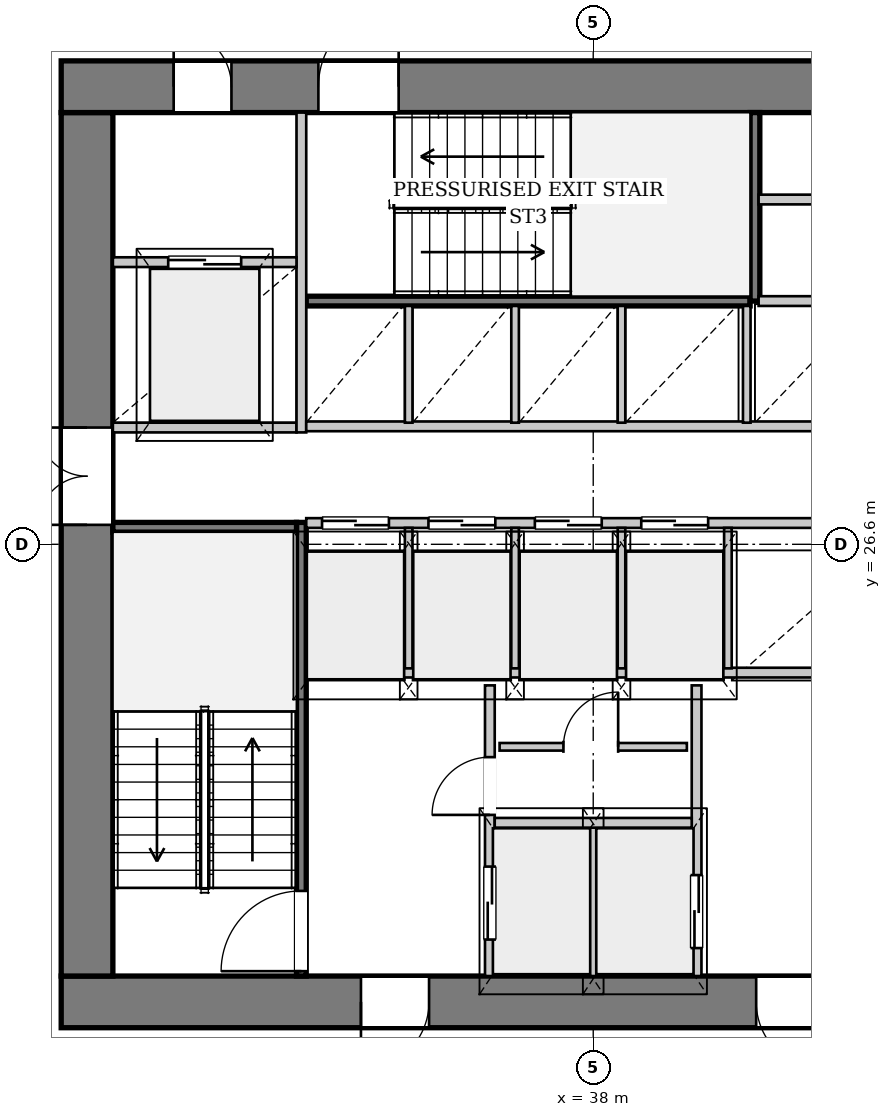
"""IFC4 building model, lengths in metres.
Left out: names, types, materials, properties, quantities, classifications, styles, units other than length and angle.
Written with IfcOpenShell. Run it as: python <this file> out.ifc"""

import sys

from ifc_helpers import new_model, si_unit, direction, frame, frame_2d, origin, place, context, subcontext, project, spatial, rectangle, extrude, source, transform, mapped, element, fill, save


model = new_model("IFC4")
c1 = context("Model", 3, precision=1e-05, world=origin(), true_north=direction((0.0, 1.0)))
c2 = subcontext(c1, "Body", "Model", "MODEL_VIEW")
j1 = project(units=[si_unit("LENGTHUNIT", "METRE"), si_unit("PLANEANGLEUNIT", "RADIAN")], contexts=[c1])
p1 = place(None, origin())
s1 = spatial("IfcSite", under=j1, at=p1, CompositionType="ELEMENT")
p2 = place(p1, origin())
s2 = spatial("IfcBuilding", under=s1, at=p2, CompositionType="ELEMENT")
p3 = place(p2, frame((0.0, 0.0, 43.5)))
s3 = spatial("IfcBuildingStorey", under=s2, at=p3, CompositionType="ELEMENT", Elevation=43.5)
p4 = place(p3, frame((46.75, 19.075, 0.0), z_axis=(0.0, 0.0, 1.0), x_axis=(-1.0, 0.0, 0.0)))
e1 = element("IfcWall", 1, at=p4, inside=s3, PredefinedType="SHEAR", context=c2, shape_type="SweptSolid", body=[
    extrude(rectangle(XDim=17.5, YDim=0.85, at=frame_2d((8.75, 0.0))), origin(), (0.0, 0.0, 1.0), 3.3),
])
p5 = place(p4, frame((4.95, 0.0, 0.0)))
e2 = element("IfcOpeningElement", 2, at=p5, cuts=e1, PredefinedType="OPENING", context=c2, shape_type="SweptSolid", body=[
    extrude(rectangle(XDim=1.12, YDim=2.25, at=frame_2d((0.56, 1.125))), frame((0.0, 0.435, 0.0), z_axis=(0.0, -1.0, 0.0), x_axis=(1.0, 0.0, 0.0)), (0.0, 0.0, 1.0), 0.87),
])
p6 = place(p4, frame((11.45, 0.0, 0.0)))
e3 = element("IfcOpeningElement", 3, at=p6, cuts=e1, PredefinedType="OPENING", context=c2, shape_type="SweptSolid", body=[
    extrude(rectangle(XDim=1.12, YDim=2.25, at=frame_2d((0.56, 1.125))), frame((0.0, 0.435, 0.0), z_axis=(0.0, -1.0, 0.0), x_axis=(1.0, 0.0, 0.0)), (0.0, 0.0, 1.0), 0.87),
])
p7 = place(p3, frame((29.675, 19.5, 0.0), z_axis=(0.0, 0.0, 1.0), x_axis=(0.0, 1.0, 0.0)))
e4 = element("IfcWall", 4, at=p7, inside=s3, PredefinedType="SHEAR", context=c2, shape_type="SweptSolid", body=[
    extrude(rectangle(XDim=14.2, YDim=0.85, at=frame_2d((7.1, 0.0))), origin(), (0.0, 0.0, 1.0), 3.3),
])
p8 = place(p7, frame((7.42, 0.0, 0.0)))
e5 = element("IfcOpeningElement", 5, at=p8, cuts=e4, PredefinedType="OPENING", context=c2, shape_type="SweptSolid", body=[
    extrude(rectangle(XDim=1.6, YDim=2.2, at=frame_2d((0.8, 1.1))), frame((0.0, 0.435, 0.0), z_axis=(0.0, -1.0, 0.0), x_axis=(1.0, 0.0, 0.0)), (0.0, 0.0, 1.0), 0.87),
])
p9 = place(p3, frame((29.25, 34.125, 0.0), z_axis=(0.0, 0.0, 1.0), x_axis=(1.0, 0.0, 0.0)))
e6 = element("IfcWall", 6, at=p9, inside=s3, PredefinedType="SHEAR", context=c2, shape_type="SweptSolid", body=[
    extrude(rectangle(XDim=17.5, YDim=0.85, at=frame_2d((8.75, 0.0))), origin(), (0.0, 0.0, 1.0), 3.3),
])
p10 = place(p9, frame((1.85, 0.0, 0.0)))
e7 = element("IfcOpeningElement", 7, at=p10, cuts=e6, PredefinedType="OPENING", context=c2, shape_type="SweptSolid", body=[
    extrude(rectangle(XDim=0.95, YDim=2.1, at=frame_2d((0.475, 1.05))), frame((0.0, 0.435, 0.0), z_axis=(0.0, -1.0, 0.0), x_axis=(1.0, 0.0, 0.0)), (0.0, 0.0, 1.0), 0.87),
])
p11 = place(p9, frame((4.23, 0.0, 0.0)))
e8 = element("IfcOpeningElement", 8, at=p11, cuts=e6, PredefinedType="OPENING", context=c2, shape_type="SweptSolid", body=[
    extrude(rectangle(XDim=1.32, YDim=2.2, at=frame_2d((0.66, 1.1))), frame((0.0, 0.435, 0.0), z_axis=(0.0, -1.0, 0.0), x_axis=(1.0, 0.0, 0.0)), (0.0, 0.0, 1.0), 0.87),
])
p12 = place(p9, frame((15.3, 0.0, 0.0)))
e9 = element("IfcOpeningElement", 9, at=p12, cuts=e6, PredefinedType="OPENING", context=c2, shape_type="SweptSolid", body=[
    extrude(rectangle(XDim=0.95, YDim=2.1, at=frame_2d((0.475, 1.05))), frame((0.0, 0.435, 0.0), z_axis=(0.0, -1.0, 0.0), x_axis=(1.0, 0.0, 0.0)), (0.0, 0.0, 1.0), 0.87),
])
p13 = place(p3, frame((33.2, 19.5, 0.0), z_axis=(0.0, 0.0, 1.0), x_axis=(0.0, 1.0, 0.0)))
e10 = element("IfcWall", 10, at=p13, inside=s3, PredefinedType="PARTITIONING", context=c2, shape_type="SweptSolid", body=[
    extrude(rectangle(XDim=7.46, YDim=0.16, at=frame_2d((3.73, 0.0))), origin(), (0.0, 0.0, 1.0), 3.3),
])
p14 = place(p13, frame((0.08, 0.0, 0.0)))
e11 = element("IfcOpeningElement", 11, at=p14, cuts=e10, PredefinedType="OPENING", context=c2, shape_type="SweptSolid", body=[
    extrude(rectangle(XDim=1.32, YDim=2.2, at=frame_2d((0.66, 1.1))), frame((0.0, 0.09, 0.0), z_axis=(0.0, -1.0, 0.0), x_axis=(1.0, 0.0, 0.0)), (0.0, 0.0, 1.0), 0.18),
])
p15 = place(p3, frame((30.1, 26.88, 0.0), z_axis=(0.0, 0.0, 1.0), x_axis=(1.0, 0.0, 0.0)))
e12 = element("IfcWall", 12, at=p15, inside=s3, PredefinedType="PARTITIONING", context=c2, shape_type="SweptSolid", body=[
    extrude(rectangle(XDim=3.02, YDim=0.16, at=frame_2d((1.51, 0.0))), origin(), (0.0, 0.0, 1.0), 3.3),
])
p16 = place(p3, frame((33.28, 30.6, 0.0), z_axis=(0.0, 0.0, 1.0), x_axis=(1.0, 0.0, 0.0)))
e13 = element("IfcWall", 13, at=p16, inside=s3, PredefinedType="PARTITIONING", context=c2, shape_type="SweptSolid", body=[
    extrude(rectangle(XDim=7.3, YDim=0.16, at=frame_2d((3.65, 0.0))), origin(), (0.0, 0.0, 1.0), 3.3),
])
p17 = place(p3, frame((40.66, 30.6, 0.0), z_axis=(0.0, 0.0, 1.0), x_axis=(0.0, 1.0, 0.0)))
e14 = element("IfcWall", 14, at=p17, inside=s3, PredefinedType="PARTITIONING", context=c2, shape_type="SweptSolid", body=[
    extrude(rectangle(XDim=3.1, YDim=0.16, at=frame_2d((1.55, 0.0))), origin(), (0.0, 0.0, 1.0), 3.3),
])
p18 = place(p3, frame((36.3, 19.5, 0.0), z_axis=(0.0, 0.0, 1.0), x_axis=(0.0, 1.0, 0.0)))
e15 = element("IfcWall", 15, at=p18, inside=s3, PredefinedType="PARTITIONING", context=c2, shape_type="SweptSolid", body=[
    extrude(rectangle(XDim=4.78, YDim=0.16, at=frame_2d((2.39, 0.0))), origin(), (0.0, 0.0, 1.0), 3.3),
])
p19 = place(p18, frame((0.6, 0.0, 0.0)))
e16 = element("IfcOpeningElement", 16, at=p19, cuts=e15, PredefinedType="OPENING", context=c2, shape_type="SweptSolid", body=[
    extrude(rectangle(XDim=1.2, YDim=2.2, at=frame_2d((0.6, 1.1))), frame((0.0, 0.09, 0.0), z_axis=(0.0, -1.0, 0.0), x_axis=(1.0, 0.0, 0.0)), (0.0, 0.0, 1.0), 0.18),
])
p20 = place(p18, frame((2.65, 0.0, 0.0)))
e17 = element("IfcOpeningElement", 17, at=p20, cuts=e15, PredefinedType="OPENING", context=c2, shape_type="SweptSolid", body=[
    extrude(rectangle(XDim=0.95, YDim=2.1, at=frame_2d((0.475, 1.05))), frame((0.0, 0.09, 0.0), z_axis=(0.0, -1.0, 0.0), x_axis=(1.0, 0.0, 0.0)), (0.0, 0.0, 1.0), 0.18),
])
p21 = place(p3, frame((39.7, 24.28, 0.0), z_axis=(0.0, 0.0, 1.0), x_axis=(0.0, -1.0, 0.0)))
e18 = element("IfcWall", 18, at=p21, inside=s3, PredefinedType="PARTITIONING", context=c2, shape_type="SweptSolid", body=[
    extrude(rectangle(XDim=4.78, YDim=0.16, at=frame_2d((2.39, 0.0))), origin(), (0.0, 0.0, 1.0), 3.3),
])
p22 = place(p21, frame((3.12, 0.0, 0.0)))
e19 = element("IfcOpeningElement", 19, at=p22, cuts=e18, PredefinedType="OPENING", context=c2, shape_type="SweptSolid", body=[
    extrude(rectangle(XDim=1.2, YDim=2.2, at=frame_2d((0.6, 1.1))), frame((0.0, 0.09, 0.0), z_axis=(0.0, -1.0, 0.0), x_axis=(1.0, 0.0, 0.0)), (0.0, 0.0, 1.0), 0.18),
])
p23 = place(p3, frame((38.0, 19.5, 0.0), z_axis=(0.0, 0.0, 1.0), x_axis=(0.0, 1.0, 0.0)))
e20 = element("IfcWall", 20, at=p23, inside=s3, PredefinedType="PARTITIONING", context=c2, shape_type="SweptSolid", body=[
    extrude(rectangle(XDim=2.46, YDim=0.125, at=frame_2d((1.23, 0.0))), origin(), (0.0, 0.0, 1.0), 3.3),
])
p24 = place(p3, frame((36.38, 22.02, 0.0), z_axis=(0.0, 0.0, 1.0), x_axis=(1.0, 0.0, 0.0)))
e21 = element("IfcWall", 21, at=p24, inside=s3, PredefinedType="PARTITIONING", context=c2, shape_type="SweptSolid", body=[
    extrude(rectangle(XDim=3.24, YDim=0.16, at=frame_2d((1.62, 0.0))), origin(), (0.0, 0.0, 1.0), 3.3),
])
p25 = place(p3, frame((33.28, 24.49, 0.0), z_axis=(0.0, 0.0, 1.0), x_axis=(1.0, 0.0, 0.0)))
e22 = element("IfcWall", 22, at=p25, inside=s3, PredefinedType="PARTITIONING", context=c2, shape_type="SweptSolid", body=[
    extrude(rectangle(XDim=9.44, YDim=0.16, at=frame_2d((4.72, 0.0))), origin(), (0.0, 0.0, 1.0), 3.3),
])
p26 = place(p3, frame((36.46, 23.27, 0.0), z_axis=(0.0, 0.0, 1.0), x_axis=(1.0, 0.0, 0.0)))
e23 = element("IfcWall", 23, at=p26, inside=s3, PredefinedType="PARTITIONING", context=c2, shape_type="SweptSolid", body=[
    extrude(rectangle(XDim=3.08, YDim=0.125, at=frame_2d((1.54, 0.0))), origin(), (0.0, 0.0, 1.0), 3.3),
])
p27 = place(p26, frame((1.05, 0.0, 0.0)))
e24 = element("IfcOpeningElement", 24, at=p27, cuts=e23, PredefinedType="OPENING", context=c2, shape_type="SweptSolid", body=[
    extrude(rectangle(XDim=0.9, YDim=2.1, at=frame_2d((0.45, 1.05))), frame((0.0, 0.073, 0.0), z_axis=(0.0, -1.0, 0.0), x_axis=(1.0, 0.0, 0.0)), (0.0, 0.0, 1.0), 0.145),
])
p28 = place(p3, frame((30.1, 28.52, 0.0), z_axis=(0.0, 0.0, 1.0), x_axis=(1.0, 0.0, 0.0)))
e25 = element("IfcWall", 25, at=p28, inside=s3, PredefinedType="PARTITIONING", context=c2, shape_type="SweptSolid", body=[
    extrude(rectangle(XDim=3.02, YDim=0.16, at=frame_2d((1.51, 0.0))), origin(), (0.0, 0.0, 1.0), 3.3),
])
p29 = place(p3, frame((33.2, 28.44, 0.0), z_axis=(0.0, 0.0, 1.0), x_axis=(0.0, 1.0, 0.0)))
e26 = element("IfcWall", 26, at=p29, inside=s3, PredefinedType="PARTITIONING", context=c2, shape_type="SweptSolid", body=[
    extrude(rectangle(XDim=5.26, YDim=0.16, at=frame_2d((2.63, 0.0))), origin(), (0.0, 0.0, 1.0), 3.3),
])
p30 = place(p3, frame((30.1, 31.24, 0.0), z_axis=(0.0, 0.0, 1.0), x_axis=(1.0, 0.0, 0.0)))
e27 = element("IfcWall", 27, at=p30, inside=s3, PredefinedType="PARTITIONING", context=c2, shape_type="SweptSolid", body=[
    extrude(rectangle(XDim=3.02, YDim=0.16, at=frame_2d((1.51, 0.0))), origin(), (0.0, 0.0, 1.0), 3.3),
])
p31 = place(p30, frame((0.91, 0.0, 0.0)))
e28 = element("IfcOpeningElement", 28, at=p31, cuts=e27, PredefinedType="OPENING", context=c2, shape_type="SweptSolid", body=[
    extrude(rectangle(XDim=1.2, YDim=2.2, at=frame_2d((0.6, 1.1))), frame((0.0, 0.09, 0.0), z_axis=(0.0, -1.0, 0.0), x_axis=(1.0, 0.0, 0.0)), (0.0, 0.0, 1.0), 0.18),
])
p32 = place(p3, frame((33.28, 26.95, 0.0), z_axis=(0.0, 0.0, 1.0), x_axis=(1.0, 0.0, 0.0)))
e29 = element("IfcWall", 29, at=p32, inside=s3, PredefinedType="PARTITIONING", context=c2, shape_type="SweptSolid", body=[
    extrude(rectangle(XDim=9.44, YDim=0.16, at=frame_2d((4.72, 0.0))), origin(), (0.0, 0.0, 1.0), 3.3),
])
p33 = place(p32, frame((0.26, 0.0, 0.0)))
e30 = element("IfcOpeningElement", 30, at=p33, cuts=e29, PredefinedType="OPENING", context=c2, shape_type="SweptSolid", body=[
    extrude(rectangle(XDim=1.1, YDim=2.2, at=frame_2d((0.55, 1.1))), frame((0.0, 0.09, 0.0), z_axis=(0.0, -1.0, 0.0), x_axis=(1.0, 0.0, 0.0)), (0.0, 0.0, 1.0), 0.18),
])
p34 = place(p32, frame((2.01, 0.0, 0.0)))
e31 = element("IfcOpeningElement", 31, at=p34, cuts=e29, PredefinedType="OPENING", context=c2, shape_type="SweptSolid", body=[
    extrude(rectangle(XDim=1.1, YDim=2.2, at=frame_2d((0.55, 1.1))), frame((0.0, 0.09, 0.0), z_axis=(0.0, -1.0, 0.0), x_axis=(1.0, 0.0, 0.0)), (0.0, 0.0, 1.0), 0.18),
])
p35 = place(p32, frame((3.76, 0.0, 0.0)))
e32 = element("IfcOpeningElement", 32, at=p35, cuts=e29, PredefinedType="OPENING", context=c2, shape_type="SweptSolid", body=[
    extrude(rectangle(XDim=1.1, YDim=2.2, at=frame_2d((0.55, 1.1))), frame((0.0, 0.09, 0.0), z_axis=(0.0, -1.0, 0.0), x_axis=(1.0, 0.0, 0.0)), (0.0, 0.0, 1.0), 0.18),
])
p36 = place(p32, frame((5.51, 0.0, 0.0)))
e33 = element("IfcOpeningElement", 33, at=p36, cuts=e29, PredefinedType="OPENING", context=c2, shape_type="SweptSolid", body=[
    extrude(rectangle(XDim=1.1, YDim=2.2, at=frame_2d((0.55, 1.1))), frame((0.0, 0.09, 0.0), z_axis=(0.0, -1.0, 0.0), x_axis=(1.0, 0.0, 0.0)), (0.0, 0.0, 1.0), 0.18),
])
for number, where, z_axis, x_axis in (
    (34, (34.965, 24.56, 0.0), (0.0, 0.0, 1.0), (0.0, 1.0, 0.0)),
    (35, (36.715, 24.56, 0.0), (0.0, 0.0, 1.0), (0.0, 1.0, 0.0)),
    (36, (38.465, 24.56, 0.0), (0.0, 0.0, 1.0), (0.0, 1.0, 0.0)),
    (37, (40.215, 24.56, 0.0), (0.0, 0.0, 1.0), (0.0, 1.0, 0.0)),
):
    element("IfcWall", number, at=place(p3, frame(where, z_axis=z_axis, x_axis=x_axis)), inside=s3, PredefinedType="PARTITIONING", context=c2, shape_type="SweptSolid", body=[
        extrude(rectangle(XDim=2.31, YDim=0.125, at=frame_2d((1.155, 0.0))), origin(), (0.0, 0.0, 1.0), 3.3),
    ])
p37 = place(p3, frame((33.28, 28.54, 0.0), z_axis=(0.0, 0.0, 1.0), x_axis=(1.0, 0.0, 0.0)))
e38 = element("IfcWall", 38, at=p37, inside=s3, PredefinedType="PARTITIONING", context=c2, shape_type="SweptSolid", body=[
    extrude(rectangle(XDim=12.62, YDim=0.16, at=frame_2d((6.31, 0.0))), origin(), (0.0, 0.0, 1.0), 3.3),
])
p38 = place(p3, frame((40.72, 30.6, 0.0), z_axis=(0.0, 0.0, 1.0), x_axis=(1.0, 0.0, 0.0)))
e39 = element("IfcWall", 39, at=p38, inside=s3, PredefinedType="PARTITIONING", context=c2, shape_type="SweptSolid", body=[
    extrude(rectangle(XDim=5.18, YDim=0.16, at=frame_2d((2.59, 0.0))), origin(), (0.0, 0.0, 1.0), 3.3),
])
for number, where, z_axis, x_axis in (
    (40, (34.965, 28.6, 0.0), (0.0, 0.0, 1.0), (0.0, 1.0, 0.0)),
    (41, (36.715, 28.6, 0.0), (0.0, 0.0, 1.0), (0.0, 1.0, 0.0)),
    (42, (38.465, 28.6, 0.0), (0.0, 0.0, 1.0), (0.0, 1.0, 0.0)),
    (43, (40.525, 28.6, 0.0), (0.0, 0.0, 1.0), (0.0, 1.0, 0.0)),
):
    element("IfcWall", number, at=place(p3, frame(where, z_axis=z_axis, x_axis=x_axis)), inside=s3, PredefinedType="PARTITIONING", context=c2, shape_type="SweptSolid", body=[
        extrude(rectangle(XDim=1.92, YDim=0.125, at=frame_2d((0.96, 0.0))), origin(), (0.0, 0.0, 1.0), 3.3),
    ])
p39 = place(p3, frame((40.72, 32.27, 0.0), z_axis=(0.0, 0.0, 1.0), x_axis=(1.0, 0.0, 0.0)))
e44 = element("IfcWall", 44, at=p39, inside=s3, PredefinedType="PARTITIONING", context=c2, shape_type="SweptSolid", body=[
    extrude(rectangle(XDim=5.03, YDim=0.16, at=frame_2d((2.515, 0.0))), origin(), (0.0, 0.0, 1.0), 3.3),
])
p40 = place(p39, frame((2.1, 0.0, 0.0)))
e45 = element("IfcOpeningElement", 45, at=p40, cuts=e44, PredefinedType="OPENING", context=c2, shape_type="SweptSolid", body=[
    extrude(rectangle(XDim=0.95, YDim=2.1, at=frame_2d((0.475, 1.05))), frame((0.0, 0.09, 0.0), z_axis=(0.0, -1.0, 0.0), x_axis=(1.0, 0.0, 0.0)), (0.0, 0.0, 1.0), 0.18),
])
m1 = source(origin(), c2, "Body", "SweptSolid", [
    extrude(rectangle(XDim=1.12, YDim=2.25, at=frame_2d((0.56, 1.125))), frame((0.0, 0.025, 0.0), z_axis=(0.0, -1.0, 0.0), x_axis=(1.0, 0.0, 0.0)), (0.0, 0.0, 1.0), 0.05),
])
p41 = place(p5, origin())
e46 = element("IfcDoor", 46, at=p41, inside=s3, OperationType="SINGLE_SWING_LEFT", PredefinedType="DOOR", context=c2, shape_type="MappedRepresentation", body=[
    mapped(m1, transform((0.0, 0.0, 0.0), x_axis=(1.0, 0.0, 0.0), y_axis=(0.0, 1.0, 0.0), z_axis=(0.0, 0.0, 1.0), scale=1.0)),
])
fill(e2, e46)
p42 = place(p6, origin())
e47 = element("IfcDoor", 47, at=p42, inside=s3, OperationType="SINGLE_SWING_RIGHT", PredefinedType="DOOR", context=c2, shape_type="MappedRepresentation", body=[
    mapped(m1, transform((0.0, 0.0, 0.0), x_axis=(1.0, 0.0, 0.0), y_axis=(0.0, 1.0, 0.0), z_axis=(0.0, 0.0, 1.0), scale=1.0)),
])
fill(e3, e47)
m2 = source(origin(), c2, "Body", "SweptSolid", [
    extrude(rectangle(XDim=1.6, YDim=2.2, at=frame_2d((0.8, 1.1))), frame((0.0, 0.025, 0.0), z_axis=(0.0, -1.0, 0.0), x_axis=(1.0, 0.0, 0.0)), (0.0, 0.0, 1.0), 0.05),
])
p43 = place(p8, origin())
e48 = element("IfcDoor", 48, at=p43, inside=s3, OperationType="DOUBLE_DOOR_SINGLE_SWING", PredefinedType="DOOR", context=c2, shape_type="MappedRepresentation", body=[
    mapped(m2, transform((0.0, 0.0, 0.0), x_axis=(1.0, 0.0, 0.0), y_axis=(0.0, 1.0, 0.0), z_axis=(0.0, 0.0, 1.0), scale=1.0)),
])
fill(e5, e48)
m3 = source(origin(), c2, "Body", "SweptSolid", [
    extrude(rectangle(XDim=0.95, YDim=2.1, at=frame_2d((0.475, 1.05))), frame((0.0, 0.025, 0.0), z_axis=(0.0, -1.0, 0.0), x_axis=(1.0, 0.0, 0.0)), (0.0, 0.0, 1.0), 0.05),
])
p44 = place(p10, origin())
e49 = element("IfcDoor", 49, at=p44, inside=s3, OperationType="SINGLE_SWING_LEFT", PredefinedType="DOOR", context=c2, shape_type="MappedRepresentation", body=[
    mapped(m3, transform((0.0, 0.0, 0.0), x_axis=(1.0, 0.0, 0.0), y_axis=(0.0, 1.0, 0.0), z_axis=(0.0, 0.0, 1.0), scale=1.0)),
])
fill(e7, e49)
m4 = source(origin(), c2, "Body", "SweptSolid", [
    extrude(rectangle(XDim=1.32, YDim=2.2, at=frame_2d((0.66, 1.1))), frame((0.0, 0.025, 0.0), z_axis=(0.0, -1.0, 0.0), x_axis=(1.0, 0.0, 0.0)), (0.0, 0.0, 1.0), 0.05),
])
p45 = place(p11, origin())
e50 = element("IfcDoor", 50, at=p45, inside=s3, OperationType="SINGLE_SWING_RIGHT", PredefinedType="DOOR", context=c2, shape_type="MappedRepresentation", body=[
    mapped(m4, transform((0.0, 0.0, 0.0), x_axis=(1.0, 0.0, 0.0), y_axis=(0.0, 1.0, 0.0), z_axis=(0.0, 0.0, 1.0), scale=1.0)),
])
fill(e8, e50)
p46 = place(p14, origin())
e51 = element("IfcDoor", 51, at=p46, inside=s3, OperationType="SINGLE_SWING_LEFT", PredefinedType="DOOR", context=c2, shape_type="MappedRepresentation", body=[
    mapped(m4, transform((0.0, 0.0, 0.0), x_axis=(1.0, 0.0, 0.0), y_axis=(0.0, 1.0, 0.0), z_axis=(0.0, 0.0, 1.0), scale=1.0)),
])
fill(e11, e51)
m5 = source(origin(), c2, "Body", "SweptSolid", [
    extrude(rectangle(XDim=1.2, YDim=2.2, at=frame_2d((0.6, 1.1))), frame((0.0, 0.025, 0.0), z_axis=(0.0, -1.0, 0.0), x_axis=(1.0, 0.0, 0.0)), (0.0, 0.0, 1.0), 0.05),
])
p47 = place(p19, origin())
e52 = element("IfcDoor", 52, at=p47, inside=s3, OperationType="DOUBLE_DOOR_SLIDING", PredefinedType="DOOR", context=c2, shape_type="MappedRepresentation", body=[
    mapped(m5, transform((0.0, 0.0, 0.0), x_axis=(1.0, 0.0, 0.0), y_axis=(0.0, 1.0, 0.0), z_axis=(0.0, 0.0, 1.0), scale=1.0)),
])
fill(e16, e52)
p48 = place(p20, origin())
e53 = element("IfcDoor", 53, at=p48, inside=s3, OperationType="SINGLE_SWING_LEFT", PredefinedType="DOOR", context=c2, shape_type="MappedRepresentation", body=[
    mapped(m3, transform((0.0, 0.0, 0.0), x_axis=(1.0, 0.0, 0.0), y_axis=(0.0, 1.0, 0.0), z_axis=(0.0, 0.0, 1.0), scale=1.0)),
])
fill(e17, e53)
m6 = source(origin(), c2, "Body", "SweptSolid", [
    extrude(rectangle(XDim=0.9, YDim=2.1, at=frame_2d((0.45, 1.05))), frame((0.0, 0.025, 0.0), z_axis=(0.0, -1.0, 0.0), x_axis=(1.0, 0.0, 0.0)), (0.0, 0.0, 1.0), 0.05),
])
p49 = place(p27, origin())
e54 = element("IfcDoor", 54, at=p49, inside=s3, OperationType="SINGLE_SWING_RIGHT", PredefinedType="DOOR", context=c2, shape_type="MappedRepresentation", body=[
    mapped(m6, transform((0.0, 0.0, 0.0), x_axis=(1.0, 0.0, 0.0), y_axis=(0.0, 1.0, 0.0), z_axis=(0.0, 0.0, 1.0), scale=1.0)),
])
fill(e24, e54)
p50 = place(p22, origin())
e55 = element("IfcDoor", 55, at=p50, inside=s3, OperationType="DOUBLE_DOOR_SLIDING", PredefinedType="DOOR", context=c2, shape_type="MappedRepresentation", body=[
    mapped(m5, transform((0.0, 0.0, 0.0), x_axis=(1.0, 0.0, 0.0), y_axis=(0.0, 1.0, 0.0), z_axis=(0.0, 0.0, 1.0), scale=1.0)),
])
fill(e19, e55)
p51 = place(p31, origin())
e56 = element("IfcDoor", 56, at=p51, inside=s3, OperationType="DOUBLE_DOOR_SLIDING", PredefinedType="DOOR", context=c2, shape_type="MappedRepresentation", body=[
    mapped(m5, transform((0.0, 0.0, 0.0), x_axis=(1.0, 0.0, 0.0), y_axis=(0.0, 1.0, 0.0), z_axis=(0.0, 0.0, 1.0), scale=1.0)),
])
fill(e28, e56)
m7 = source(origin(), c2, "Body", "SweptSolid", [
    extrude(rectangle(XDim=1.1, YDim=2.2, at=frame_2d((0.55, 1.1))), frame((0.0, 0.025, 0.0), z_axis=(0.0, -1.0, 0.0), x_axis=(1.0, 0.0, 0.0)), (0.0, 0.0, 1.0), 0.05),
])
p52 = place(p33, origin())
e57 = element("IfcDoor", 57, at=p52, inside=s3, OperationType="DOUBLE_DOOR_SLIDING", PredefinedType="DOOR", context=c2, shape_type="MappedRepresentation", body=[
    mapped(m7, transform((0.0, 0.0, 0.0), x_axis=(1.0, 0.0, 0.0), y_axis=(0.0, 1.0, 0.0), z_axis=(0.0, 0.0, 1.0), scale=1.0)),
])
fill(e30, e57)
p53 = place(p34, origin())
e58 = element("IfcDoor", 58, at=p53, inside=s3, OperationType="DOUBLE_DOOR_SLIDING", PredefinedType="DOOR", context=c2, shape_type="MappedRepresentation", body=[
    mapped(m7, transform((0.0, 0.0, 0.0), x_axis=(1.0, 0.0, 0.0), y_axis=(0.0, 1.0, 0.0), z_axis=(0.0, 0.0, 1.0), scale=1.0)),
])
fill(e31, e58)
p54 = place(p35, origin())
e59 = element("IfcDoor", 59, at=p54, inside=s3, OperationType="DOUBLE_DOOR_SLIDING", PredefinedType="DOOR", context=c2, shape_type="MappedRepresentation", body=[
    mapped(m7, transform((0.0, 0.0, 0.0), x_axis=(1.0, 0.0, 0.0), y_axis=(0.0, 1.0, 0.0), z_axis=(0.0, 0.0, 1.0), scale=1.0)),
])
fill(e32, e59)
p55 = place(p36, origin())
e60 = element("IfcDoor", 60, at=p55, inside=s3, OperationType="DOUBLE_DOOR_SLIDING", PredefinedType="DOOR", context=c2, shape_type="MappedRepresentation", body=[
    mapped(m7, transform((0.0, 0.0, 0.0), x_axis=(1.0, 0.0, 0.0), y_axis=(0.0, 1.0, 0.0), z_axis=(0.0, 0.0, 1.0), scale=1.0)),
])
fill(e33, e60)
save(model, sys.argv[1])
